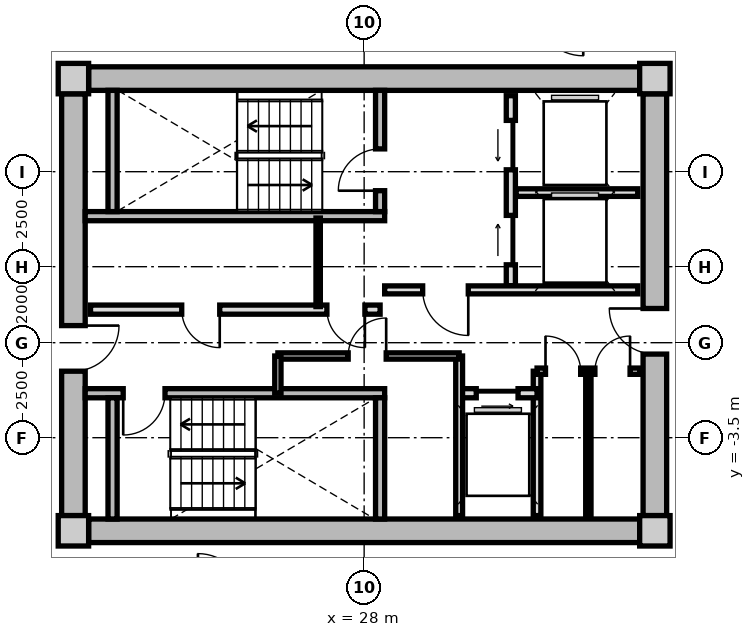
"""IFC4 building model, lengths in metres.
Left out: names, types, materials, properties, quantities, classifications, styles, units other than length and angle.
Written with IfcOpenShell. Run it as: python <this file> out.ifc"""

import sys

from ifc_helpers import new_model, si_unit, direction, frame, frame_2d, origin, origin_2d, place, context, subcontext, project, spatial, rectangle, extrude, source, transform, mapped, element, fill, save


model = new_model("IFC4")
c1 = context("Model", 3, precision=1e-05, world=origin(), true_north=direction((0.0, 1.0)))
c2 = subcontext(c1, "Body", "Model", "MODEL_VIEW")
j1 = project(units=[si_unit("LENGTHUNIT", "METRE"), si_unit("PLANEANGLEUNIT", "RADIAN")], contexts=[c1])
p1 = place(None, origin())
s1 = spatial("IfcSite", under=j1, at=p1, CompositionType="ELEMENT")
p2 = place(p1, origin())
s2 = spatial("IfcBuilding", under=s1, at=p2, CompositionType="ELEMENT")
p3 = place(p2, frame((0.0, 0.0, 164.8)))
s3 = spatial("IfcBuildingStorey", under=s2, at=p3, CompositionType="ELEMENT", Elevation=164.8)
m1 = source(origin(), c2, "Body", "SweptSolid", [
    extrude(rectangle(XDim=0.8, YDim=0.8, at=origin_2d()), origin(), (0.0, 0.0, 1.0), 3.05),
])
for number, where, z_axis, x_axis in (
    (1, (20.35, -5.95, 0.0), (0.0, 0.0, 1.0), (1.0, 0.0, 0.0)),
    (2, (35.65, -5.95, 0.0), (0.0, 0.0, 1.0), (1.0, 0.0, 0.0)),
    (3, (35.65, 5.95, 0.0), (0.0, 0.0, 1.0), (1.0, 0.0, 0.0)),
    (4, (20.35, 5.95, 0.0), (0.0, 0.0, 1.0), (1.0, 0.0, 0.0)),
):
    element("IfcColumn", number, at=place(p3, frame(where, z_axis=z_axis, x_axis=x_axis)), inside=s3, PredefinedType="COLUMN", context=c2, shape_type="MappedRepresentation", body=[
        mapped(m1, transform((0.0, 0.0, 0.0), x_axis=(1.0, 0.0, 0.0), y_axis=(0.0, 1.0, 0.0), z_axis=(0.0, 0.0, 1.0), scale=1.0)),
    ])
m2 = source(origin(), c2, "Body", "SweptSolid", [
    extrude(rectangle(XDim=14.5, YDim=0.62, at=frame_2d((7.25, 0.0))), origin(), (0.0, 0.0, 1.0), 2.81),
])
for number, where, z_axis, x_axis in (
    (5, (20.75, 5.95, 0.0), (0.0, 0.0, 1.0), (1.0, 0.0, 0.0)),
    (6, (35.25, -5.95, 0.0), (0.0, 0.0, 1.0), (-1.0, 0.0, 0.0)),
):
    element("IfcWall", number, at=place(p3, frame(where, z_axis=z_axis, x_axis=x_axis)), inside=s3, PredefinedType="SHEAR", context=c2, shape_type="MappedRepresentation", body=[
        mapped(m2, transform((0.0, 0.0, 0.0), x_axis=(1.0, 0.0, 0.0), y_axis=(0.0, 1.0, 0.0), z_axis=(0.0, 0.0, 1.0), scale=1.0)),
    ])
m3 = source(origin(), c2, "Body", "SweptSolid", [
    extrude(rectangle(XDim=11.1, YDim=0.62, at=frame_2d((5.55, 0.0))), origin(), (0.0, 0.0, 1.0), 2.81),
])
p4 = place(p3, frame((20.35, -5.55, 0.0), z_axis=(0.0, 0.0, 1.0), x_axis=(0.0, 1.0, 0.0)))
e7 = element("IfcWall", 7, at=p4, inside=s3, PredefinedType="SHEAR", context=c2, shape_type="MappedRepresentation", body=[
    mapped(m3, transform((0.0, 0.0, 0.0), x_axis=(1.0, 0.0, 0.0), y_axis=(0.0, 1.0, 0.0), z_axis=(0.0, 0.0, 1.0), scale=1.0)),
])
p5 = place(p4, frame((3.8, 0.0, 0.0)))
e8 = element("IfcOpeningElement", 8, at=p5, cuts=e7, PredefinedType="OPENING", context=c2, shape_type="SweptSolid", body=[
    extrude(rectangle(XDim=1.2, YDim=2.15, at=frame_2d((0.6, 1.075))), frame((0.0, 0.32, 0.0), z_axis=(0.0, -1.0, 0.0), x_axis=(1.0, 0.0, 0.0)), (0.0, 0.0, 1.0), 0.64),
])
p6 = place(p3, frame((35.65, 5.55, 0.0), z_axis=(0.0, 0.0, 1.0), x_axis=(0.0, -1.0, 0.0)))
e9 = element("IfcWall", 9, at=p6, inside=s3, PredefinedType="SHEAR", context=c2, shape_type="MappedRepresentation", body=[
    mapped(m3, transform((0.0, 0.0, 0.0), x_axis=(1.0, 0.0, 0.0), y_axis=(0.0, 1.0, 0.0), z_axis=(0.0, 0.0, 1.0), scale=1.0)),
])
p7 = place(p6, frame((5.65, 0.0, 0.0)))
e10 = element("IfcOpeningElement", 10, at=p7, cuts=e9, PredefinedType="OPENING", context=c2, shape_type="SweptSolid", body=[
    extrude(rectangle(XDim=1.2, YDim=2.15, at=frame_2d((0.6, 1.075))), frame((0.0, 0.32, 0.0), z_axis=(0.0, -1.0, 0.0), x_axis=(1.0, 0.0, 0.0)), (0.0, 0.0, 1.0), 0.64),
])
m4 = source(origin(), c2, "Body", "SweptSolid", [
    extrude(rectangle(XDim=7.88, YDim=0.24, at=frame_2d((3.94, 0.0))), origin(), (0.0, 0.0, 1.0), 2.81),
])
p8 = place(p3, frame((20.66, 2.33, 0.0), z_axis=(0.0, 0.0, 1.0), x_axis=(1.0, 0.0, 0.0)))
e11 = element("IfcWall", 11, at=p8, inside=s3, PredefinedType="PARTITIONING", context=c2, shape_type="MappedRepresentation", body=[
    mapped(m4, transform((0.0, 0.0, 0.0), x_axis=(1.0, 0.0, 0.0), y_axis=(0.0, 1.0, 0.0), z_axis=(0.0, 0.0, 1.0), scale=1.0)),
])
m5 = source(origin(), c2, "Body", "SweptSolid", [
    extrude(rectangle(XDim=3.19, YDim=0.24, at=frame_2d((1.595, 0.0))), origin(), (0.0, 0.0, 1.0), 2.81),
])
p9 = place(p3, frame((21.38, 2.45, 0.0), z_axis=(0.0, 0.0, 1.0), x_axis=(0.0, 1.0, 0.0)))
e12 = element("IfcWall", 12, at=p9, inside=s3, PredefinedType="PARTITIONING", context=c2, shape_type="MappedRepresentation", body=[
    mapped(m5, transform((0.0, 0.0, 0.0), x_axis=(1.0, 0.0, 0.0), y_axis=(0.0, 1.0, 0.0), z_axis=(0.0, 0.0, 1.0), scale=1.0)),
])
p10 = place(p3, frame((28.42, 2.45, 0.0), z_axis=(0.0, 0.0, 1.0), x_axis=(0.0, 1.0, 0.0)))
e13 = element("IfcWall", 13, at=p10, inside=s3, PredefinedType="PARTITIONING", context=c2, shape_type="MappedRepresentation", body=[
    mapped(m5, transform((0.0, 0.0, 0.0), x_axis=(1.0, 0.0, 0.0), y_axis=(0.0, 1.0, 0.0), z_axis=(0.0, 0.0, 1.0), scale=1.0)),
])
p11 = place(p10, frame((0.55, 0.0, 0.0)))
e14 = element("IfcOpeningElement", 14, at=p11, cuts=e13, PredefinedType="OPENING", context=c2, shape_type="SweptSolid", body=[
    extrude(rectangle(XDim=1.1, YDim=2.15, at=frame_2d((0.55, 1.075))), frame((0.0, 0.13, 0.0), z_axis=(0.0, -1.0, 0.0), x_axis=(1.0, 0.0, 0.0)), (0.0, 0.0, 1.0), 0.26),
])
p12 = place(p3, frame((20.66, -2.33, 0.0), z_axis=(0.0, 0.0, 1.0), x_axis=(1.0, 0.0, 0.0)))
e15 = element("IfcWall", 15, at=p12, inside=s3, PredefinedType="PARTITIONING", context=c2, shape_type="MappedRepresentation", body=[
    mapped(m4, transform((0.0, 0.0, 0.0), x_axis=(1.0, 0.0, 0.0), y_axis=(0.0, 1.0, 0.0), z_axis=(0.0, 0.0, 1.0), scale=1.0)),
])
p13 = place(p12, frame((1.0, 0.0, 0.0)))
e16 = element("IfcOpeningElement", 16, at=p13, cuts=e15, PredefinedType="OPENING", context=c2, shape_type="SweptSolid", body=[
    extrude(rectangle(XDim=1.1, YDim=2.15, at=frame_2d((0.55, 1.075))), frame((0.0, 0.13, 0.0), z_axis=(0.0, -1.0, 0.0), x_axis=(1.0, 0.0, 0.0)), (0.0, 0.0, 1.0), 0.26),
])
for number, where, z_axis, x_axis in (
    (17, (21.38, -5.64, 0.0), (0.0, 0.0, 1.0), (0.0, 1.0, 0.0)),
    (18, (28.42, -5.64, 0.0), (0.0, 0.0, 1.0), (0.0, 1.0, 0.0)),
):
    element("IfcWall", number, at=place(p3, frame(where, z_axis=z_axis, x_axis=x_axis)), inside=s3, PredefinedType="PARTITIONING", context=c2, shape_type="MappedRepresentation", body=[
        mapped(m5, transform((0.0, 0.0, 0.0), x_axis=(1.0, 0.0, 0.0), y_axis=(0.0, 1.0, 0.0), z_axis=(0.0, 0.0, 1.0), scale=1.0)),
    ])
m6 = source(origin(), c2, "Body", "SweptSolid", [
    extrude(rectangle(XDim=5.0, YDim=0.24, at=frame_2d((2.5, 0.0))), origin(), (0.0, 0.0, 1.0), 2.795),
])
p14 = place(p3, frame((31.86, 0.5, 0.0), z_axis=(0.0, 0.0, 1.0), x_axis=(0.0, 1.0, 0.0)))
e19 = element("IfcWall", 19, at=p14, inside=s3, PredefinedType="PARTITIONING", context=c2, shape_type="MappedRepresentation", body=[
    mapped(m6, transform((0.0, 0.0, 0.0), x_axis=(1.0, 0.0, 0.0), y_axis=(0.0, 1.0, 0.0), z_axis=(0.0, 0.0, 1.0), scale=1.0)),
])
p15 = place(p14, frame((3.05, 0.0, 0.0)))
e20 = element("IfcOpeningElement", 20, at=p15, cuts=e19, PredefinedType="OPENING", context=c2, shape_type="SweptSolid", body=[
    extrude(rectangle(XDim=1.3, YDim=2.2, at=frame_2d((0.65, 1.1))), frame((0.0, 0.13, 0.0), z_axis=(0.0, -1.0, 0.0), x_axis=(1.0, 0.0, 0.0)), (0.0, 0.0, 1.0), 0.26),
])
p16 = place(p14, frame((0.55, 0.0, 0.0)))
e21 = element("IfcOpeningElement", 21, at=p16, cuts=e19, PredefinedType="OPENING", context=c2, shape_type="SweptSolid", body=[
    extrude(rectangle(XDim=1.3, YDim=2.2, at=frame_2d((0.65, 1.1))), frame((0.0, 0.13, 0.0), z_axis=(0.0, -1.0, 0.0), x_axis=(1.0, 0.0, 0.0)), (0.0, 0.0, 1.0), 0.26),
])
m7 = source(origin(), c2, "Body", "SweptSolid", [
    extrude(rectangle(XDim=3.2, YDim=0.2, at=frame_2d((1.6, 0.0))), origin(), (0.0, 0.0, 1.0), 2.795),
])
p17 = place(p3, frame((32.0, 2.95, 0.0), z_axis=(0.0, 0.0, 1.0), x_axis=(1.0, 0.0, 0.0)))
e22 = element("IfcWall", 22, at=p17, inside=s3, PredefinedType="PARTITIONING", context=c2, shape_type="MappedRepresentation", body=[
    mapped(m7, transform((0.0, 0.0, 0.0), x_axis=(1.0, 0.0, 0.0), y_axis=(0.0, 1.0, 0.0), z_axis=(0.0, 0.0, 1.0), scale=1.0)),
])
m8 = source(origin(), c2, "Body", "SweptSolid", [
    extrude(rectangle(XDim=6.66, YDim=0.21, at=frame_2d((3.33, 0.0))), origin(), (0.0, 0.0, 1.0), 2.795),
])
p18 = place(p3, frame((28.54, 0.39, 0.0), z_axis=(0.0, 0.0, 1.0), x_axis=(1.0, 0.0, 0.0)))
e23 = element("IfcWall", 23, at=p18, inside=s3, PredefinedType="PARTITIONING", context=c2, shape_type="MappedRepresentation", body=[
    mapped(m8, transform((0.0, 0.0, 0.0), x_axis=(1.0, 0.0, 0.0), y_axis=(0.0, 1.0, 0.0), z_axis=(0.0, 0.0, 1.0), scale=1.0)),
])
p19 = place(p18, frame((1.0, 0.0, 0.0)))
e24 = element("IfcOpeningElement", 24, at=p19, cuts=e23, PredefinedType="OPENING", context=c2, shape_type="SweptSolid", body=[
    extrude(rectangle(XDim=1.2, YDim=2.15, at=frame_2d((0.6, 1.075))), frame((0.0, 0.115, 0.0), z_axis=(0.0, -1.0, 0.0), x_axis=(1.0, 0.0, 0.0)), (0.0, 0.0, 1.0), 0.23),
])
m9 = source(origin(), c2, "Body", "SweptSolid", [
    extrude(rectangle(XDim=7.62, YDim=0.24, at=frame_2d((3.81, 0.0))), origin(), (0.0, 0.0, 1.0), 2.795),
])
p20 = place(p3, frame((20.8, -0.13, 0.0), z_axis=(0.0, 0.0, 1.0), x_axis=(1.0, 0.0, 0.0)))
e25 = element("IfcWall", 25, at=p20, inside=s3, PredefinedType="PARTITIONING", context=c2, shape_type="MappedRepresentation", body=[
    mapped(m9, transform((0.0, 0.0, 0.0), x_axis=(1.0, 0.0, 0.0), y_axis=(0.0, 1.0, 0.0), z_axis=(0.0, 0.0, 1.0), scale=1.0)),
])
p21 = place(p20, frame((6.22, 0.0, 0.0)))
e26 = element("IfcOpeningElement", 26, at=p21, cuts=e25, PredefinedType="OPENING", context=c2, shape_type="SweptSolid", body=[
    extrude(rectangle(XDim=1.0, YDim=2.1, at=frame_2d((0.5, 1.05))), frame((0.0, 0.13, 0.0), z_axis=(0.0, -1.0, 0.0), x_axis=(1.0, 0.0, 0.0)), (0.0, 0.0, 1.0), 0.26),
])
p22 = place(p20, frame((2.4, 0.0, 0.0)))
e27 = element("IfcOpeningElement", 27, at=p22, cuts=e25, PredefinedType="OPENING", context=c2, shape_type="SweptSolid", body=[
    extrude(rectangle(XDim=1.0, YDim=2.1, at=frame_2d((0.5, 1.05))), frame((0.0, 0.13, 0.0), z_axis=(0.0, -1.0, 0.0), x_axis=(1.0, 0.0, 0.0)), (0.0, 0.0, 1.0), 0.26),
])
m10 = source(origin(), c2, "Body", "SweptSolid", [
    extrude(rectangle(XDim=2.33, YDim=0.115, at=frame_2d((1.165, 0.0))), origin(), (0.0, 0.0, 1.0), 2.795),
])
p23 = place(p3, frame((26.79, -0.05, 0.0), z_axis=(0.0, 0.0, 1.0), x_axis=(0.0, 1.0, 0.0)))
e28 = element("IfcWall", 28, at=p23, inside=s3, PredefinedType="PARTITIONING", context=c2, shape_type="MappedRepresentation", body=[
    mapped(m10, transform((0.0, 0.0, 0.0), x_axis=(1.0, 0.0, 0.0), y_axis=(0.0, 1.0, 0.0), z_axis=(0.0, 0.0, 1.0), scale=1.0)),
])
m11 = source(origin(), c2, "Body", "SweptSolid", [
    extrude(rectangle(XDim=3.8, YDim=0.2, at=frame_2d((1.9, 0.0))), origin(), (0.0, 0.0, 1.0), 2.795),
])
p24 = place(p3, frame((32.55, -5.55, 0.0), z_axis=(0.0, 0.0, 1.0), x_axis=(0.0, 1.0, 0.0)))
e29 = element("IfcWall", 29, at=p24, inside=s3, PredefinedType="PARTITIONING", context=c2, shape_type="MappedRepresentation", body=[
    mapped(m11, transform((0.0, 0.0, 0.0), x_axis=(1.0, 0.0, 0.0), y_axis=(0.0, 1.0, 0.0), z_axis=(0.0, 0.0, 1.0), scale=1.0)),
])
m12 = source(origin(), c2, "Body", "SweptSolid", [
    extrude(rectangle(XDim=2.05, YDim=0.24, at=frame_2d((1.025, 0.0))), origin(), (0.0, 0.0, 1.0), 2.795),
])
p25 = place(p3, frame((30.5, -2.33, 0.0), z_axis=(0.0, 0.0, 1.0), x_axis=(1.0, 0.0, 0.0)))
e30 = element("IfcWall", 30, at=p25, inside=s3, PredefinedType="PARTITIONING", context=c2, shape_type="MappedRepresentation", body=[
    mapped(m12, transform((0.0, 0.0, 0.0), x_axis=(1.0, 0.0, 0.0), y_axis=(0.0, 1.0, 0.0), z_axis=(0.0, 0.0, 1.0), scale=1.0)),
])
p26 = place(p25, frame((0.45, 0.0, 0.0)))
e31 = element("IfcOpeningElement", 31, at=p26, cuts=e30, PredefinedType="OPENING", context=c2, shape_type="SweptSolid", body=[
    extrude(rectangle(XDim=1.1, YDim=2.2, at=frame_2d((0.55, 1.1))), frame((0.0, 0.13, 0.0), z_axis=(0.0, -1.0, 0.0), x_axis=(1.0, 0.0, 0.0)), (0.0, 0.0, 1.0), 0.26),
])
m13 = source(origin(), c2, "Body", "SweptSolid", [
    extrude(rectangle(XDim=4.2, YDim=0.18, at=frame_2d((2.1, 0.0))), origin(), (0.0, 0.0, 1.0), 2.795),
])
p27 = place(p3, frame((30.5, -5.55, 0.0), z_axis=(0.0, 0.0, 1.0), x_axis=(0.0, 1.0, 0.0)))
e32 = element("IfcWall", 32, at=p27, inside=s3, PredefinedType="PARTITIONING", context=c2, shape_type="MappedRepresentation", body=[
    mapped(m13, transform((0.0, 0.0, 0.0), x_axis=(1.0, 0.0, 0.0), y_axis=(0.0, 1.0, 0.0), z_axis=(0.0, 0.0, 1.0), scale=1.0)),
])
m14 = source(origin(), c2, "Body", "SweptSolid", [
    extrude(rectangle(XDim=4.77, YDim=0.165, at=frame_2d((2.385, 0.0))), origin(), (0.0, 0.0, 1.0), 2.795),
])
p28 = place(p3, frame((25.73, -1.35, 0.0), z_axis=(0.0, 0.0, 1.0), x_axis=(1.0, 0.0, 0.0)))
e33 = element("IfcWall", 33, at=p28, inside=s3, PredefinedType="PARTITIONING", context=c2, shape_type="MappedRepresentation", body=[
    mapped(m14, transform((0.0, 0.0, 0.0), x_axis=(1.0, 0.0, 0.0), y_axis=(0.0, 1.0, 0.0), z_axis=(0.0, 0.0, 1.0), scale=1.0)),
])
p29 = place(p28, frame((1.85, 0.0, 0.0)))
e34 = element("IfcOpeningElement", 34, at=p29, cuts=e33, PredefinedType="OPENING", context=c2, shape_type="SweptSolid", body=[
    extrude(rectangle(XDim=1.0, YDim=2.1, at=frame_2d((0.5, 1.05))), frame((0.0, 0.093, 0.0), z_axis=(0.0, -1.0, 0.0), x_axis=(1.0, 0.0, 0.0)), (0.0, 0.0, 1.0), 0.185),
])
m15 = source(origin(), c2, "Body", "SweptSolid", [
    extrude(rectangle(XDim=0.98, YDim=0.165, at=frame_2d((0.49, 0.0))), origin(), (0.0, 0.0, 1.0), 2.795),
])
p30 = place(p3, frame((25.73, -2.33, 0.0), z_axis=(0.0, 0.0, 1.0), x_axis=(0.0, 1.0, 0.0)))
e35 = element("IfcWall", 35, at=p30, inside=s3, PredefinedType="PARTITIONING", context=c2, shape_type="MappedRepresentation", body=[
    mapped(m15, transform((0.0, 0.0, 0.0), x_axis=(1.0, 0.0, 0.0), y_axis=(0.0, 1.0, 0.0), z_axis=(0.0, 0.0, 1.0), scale=1.0)),
])
m16 = source(origin(), c2, "Body", "SweptSolid", [
    extrude(rectangle(XDim=2.7, YDim=0.165, at=frame_2d((1.35, 0.0))), origin(), (0.0, 0.0, 1.0), 2.795),
])
p31 = place(p3, frame((32.55, -1.75, 0.0), z_axis=(0.0, 0.0, 1.0), x_axis=(1.0, 0.0, 0.0)))
e36 = element("IfcWall", 36, at=p31, inside=s3, PredefinedType="PARTITIONING", context=c2, shape_type="MappedRepresentation", body=[
    mapped(m16, transform((0.0, 0.0, 0.0), x_axis=(1.0, 0.0, 0.0), y_axis=(0.0, 1.0, 0.0), z_axis=(0.0, 0.0, 1.0), scale=1.0)),
])
p32 = place(p31, frame((0.222, 0.0, 0.0)))
e37 = element("IfcOpeningElement", 37, at=p32, cuts=e36, PredefinedType="OPENING", context=c2, shape_type="SweptSolid", body=[
    extrude(rectangle(XDim=0.925, YDim=2.1, at=frame_2d((0.462, 1.05))), frame((0.0, 0.093, 0.0), z_axis=(0.0, -1.0, 0.0), x_axis=(1.0, 0.0, 0.0)), (0.0, 0.0, 1.0), 0.185),
])
p33 = place(p31, frame((1.522, 0.0, 0.0)))
e38 = element("IfcOpeningElement", 38, at=p33, cuts=e36, PredefinedType="OPENING", context=c2, shape_type="SweptSolid", body=[
    extrude(rectangle(XDim=0.925, YDim=2.1, at=frame_2d((0.462, 1.05))), frame((0.0, 0.093, 0.0), z_axis=(0.0, -1.0, 0.0), x_axis=(1.0, 0.0, 0.0)), (0.0, 0.0, 1.0), 0.185),
])
m17 = source(origin(), c2, "Body", "SweptSolid", [
    extrude(rectangle(XDim=3.8, YDim=0.14, at=frame_2d((1.9, 0.0))), origin(), (0.0, 0.0, 1.0), 2.795),
])
p34 = place(p3, frame((33.9, -5.55, 0.0), z_axis=(0.0, 0.0, 1.0), x_axis=(0.0, 1.0, 0.0)))
e39 = element("IfcWall", 39, at=p34, inside=s3, PredefinedType="PARTITIONING", context=c2, shape_type="MappedRepresentation", body=[
    mapped(m17, transform((0.0, 0.0, 0.0), x_axis=(1.0, 0.0, 0.0), y_axis=(0.0, 1.0, 0.0), z_axis=(0.0, 0.0, 1.0), scale=1.0)),
])
m18 = source(origin(), c2, "Body", "SweptSolid", [
    extrude(rectangle(XDim=1.1, YDim=2.15, at=frame_2d((0.55, 1.075))), frame((0.0, 0.025, 0.0), z_axis=(0.0, -1.0, 0.0), x_axis=(1.0, 0.0, 0.0)), (0.0, 0.0, 1.0), 0.05),
])
p35 = place(p11, origin())
e40 = element("IfcDoor", 40, at=p35, inside=s3, OperationType="SINGLE_SWING_LEFT", PredefinedType="DOOR", context=c2, shape_type="MappedRepresentation", body=[
    mapped(m18, transform((0.0, 0.0, 0.0), x_axis=(1.0, 0.0, 0.0), y_axis=(0.0, 1.0, 0.0), z_axis=(0.0, 0.0, 1.0), scale=1.0)),
])
fill(e14, e40)
p36 = place(p13, frame((1.1, 0.0, 0.0), z_axis=(0.0, 0.0, 1.0), x_axis=(-1.0, 0.0, 0.0)))
e41 = element("IfcDoor", 41, at=p36, inside=s3, OperationType="SINGLE_SWING_RIGHT", PredefinedType="DOOR", context=c2, shape_type="MappedRepresentation", body=[
    mapped(m18, transform((0.0, 0.0, 0.0), x_axis=(1.0, 0.0, 0.0), y_axis=(0.0, 1.0, 0.0), z_axis=(0.0, 0.0, 1.0), scale=1.0)),
])
fill(e16, e41)
m19 = source(origin(), c2, "Body", "SweptSolid", [
    extrude(rectangle(XDim=1.3, YDim=2.2, at=frame_2d((0.65, 1.1))), frame((0.0, 0.025, 0.0), z_axis=(0.0, -1.0, 0.0), x_axis=(1.0, 0.0, 0.0)), (0.0, 0.0, 1.0), 0.05),
])
p37 = place(p15, origin())
e42 = element("IfcDoor", 42, at=p37, inside=s3, OperationType="SLIDING_TO_LEFT", PredefinedType="DOOR", context=c2, shape_type="MappedRepresentation", body=[
    mapped(m19, transform((0.0, 0.0, 0.0), x_axis=(1.0, 0.0, 0.0), y_axis=(0.0, 1.0, 0.0), z_axis=(0.0, 0.0, 1.0), scale=1.0)),
])
fill(e20, e42)
p38 = place(p16, origin())
e43 = element("IfcDoor", 43, at=p38, inside=s3, OperationType="SLIDING_TO_RIGHT", PredefinedType="DOOR", context=c2, shape_type="MappedRepresentation", body=[
    mapped(m19, transform((0.0, 0.0, 0.0), x_axis=(1.0, 0.0, 0.0), y_axis=(0.0, 1.0, 0.0), z_axis=(0.0, 0.0, 1.0), scale=1.0)),
])
fill(e21, e43)
m20 = source(origin(), c2, "Body", "SweptSolid", [
    extrude(rectangle(XDim=1.2, YDim=2.15, at=frame_2d((0.6, 1.075))), frame((0.0, 0.025, 0.0), z_axis=(0.0, -1.0, 0.0), x_axis=(1.0, 0.0, 0.0)), (0.0, 0.0, 1.0), 0.05),
])
p39 = place(p19, frame((1.2, 0.0, 0.0), z_axis=(0.0, 0.0, 1.0), x_axis=(-1.0, 0.0, 0.0)))
e44 = element("IfcDoor", 44, at=p39, inside=s3, OperationType="SINGLE_SWING_LEFT", PredefinedType="DOOR", context=c2, shape_type="MappedRepresentation", body=[
    mapped(m20, transform((0.0, 0.0, 0.0), x_axis=(1.0, 0.0, 0.0), y_axis=(0.0, 1.0, 0.0), z_axis=(0.0, 0.0, 1.0), scale=1.0)),
])
fill(e24, e44)
p40 = place(p5, frame((1.2, 0.0, 0.0), z_axis=(0.0, 0.0, 1.0), x_axis=(-1.0, 0.0, 0.0)))
e45 = element("IfcDoor", 45, at=p40, inside=s3, OperationType="SINGLE_SWING_LEFT", PredefinedType="DOOR", context=c2, shape_type="MappedRepresentation", body=[
    mapped(m20, transform((0.0, 0.0, 0.0), x_axis=(1.0, 0.0, 0.0), y_axis=(0.0, 1.0, 0.0), z_axis=(0.0, 0.0, 1.0), scale=1.0)),
])
fill(e8, e45)
p41 = place(p7, frame((1.2, 0.0, 0.0), z_axis=(0.0, 0.0, 1.0), x_axis=(-1.0, 0.0, 0.0)))
e46 = element("IfcDoor", 46, at=p41, inside=s3, OperationType="SINGLE_SWING_RIGHT", PredefinedType="DOOR", context=c2, shape_type="MappedRepresentation", body=[
    mapped(m20, transform((0.0, 0.0, 0.0), x_axis=(1.0, 0.0, 0.0), y_axis=(0.0, 1.0, 0.0), z_axis=(0.0, 0.0, 1.0), scale=1.0)),
])
fill(e10, e46)
m21 = source(origin(), c2, "Body", "SweptSolid", [
    extrude(rectangle(XDim=1.0, YDim=2.1, at=frame_2d((0.5, 1.05))), frame((0.0, 0.025, 0.0), z_axis=(0.0, -1.0, 0.0), x_axis=(1.0, 0.0, 0.0)), (0.0, 0.0, 1.0), 0.05),
])
p42 = place(p21, frame((1.0, 0.0, 0.0), z_axis=(0.0, 0.0, 1.0), x_axis=(-1.0, 0.0, 0.0)))
e47 = element("IfcDoor", 47, at=p42, inside=s3, OperationType="SINGLE_SWING_LEFT", PredefinedType="DOOR", context=c2, shape_type="MappedRepresentation", body=[
    mapped(m21, transform((0.0, 0.0, 0.0), x_axis=(1.0, 0.0, 0.0), y_axis=(0.0, 1.0, 0.0), z_axis=(0.0, 0.0, 1.0), scale=1.0)),
])
fill(e26, e47)
p43 = place(p22, frame((1.0, 0.0, 0.0), z_axis=(0.0, 0.0, 1.0), x_axis=(-1.0, 0.0, 0.0)))
e48 = element("IfcDoor", 48, at=p43, inside=s3, OperationType="SINGLE_SWING_LEFT", PredefinedType="DOOR", context=c2, shape_type="MappedRepresentation", body=[
    mapped(m21, transform((0.0, 0.0, 0.0), x_axis=(1.0, 0.0, 0.0), y_axis=(0.0, 1.0, 0.0), z_axis=(0.0, 0.0, 1.0), scale=1.0)),
])
fill(e27, e48)
m22 = source(origin(), c2, "Body", "SweptSolid", [
    extrude(rectangle(XDim=1.1, YDim=2.2, at=frame_2d((0.55, 1.1))), frame((0.0, 0.025, 0.0), z_axis=(0.0, -1.0, 0.0), x_axis=(1.0, 0.0, 0.0)), (0.0, 0.0, 1.0), 0.05),
])
p44 = place(p26, frame((1.1, 0.0, 0.0), z_axis=(0.0, 0.0, 1.0), x_axis=(-1.0, 0.0, 0.0)))
e49 = element("IfcDoor", 49, at=p44, inside=s3, OperationType="SLIDING_TO_RIGHT", PredefinedType="DOOR", context=c2, shape_type="MappedRepresentation", body=[
    mapped(m22, transform((0.0, 0.0, 0.0), x_axis=(1.0, 0.0, 0.0), y_axis=(0.0, 1.0, 0.0), z_axis=(0.0, 0.0, 1.0), scale=1.0)),
])
fill(e31, e49)
p45 = place(p29, origin())
e50 = element("IfcDoor", 50, at=p45, inside=s3, OperationType="SINGLE_SWING_RIGHT", PredefinedType="DOOR", context=c2, shape_type="MappedRepresentation", body=[
    mapped(m21, transform((0.0, 0.0, 0.0), x_axis=(1.0, 0.0, 0.0), y_axis=(0.0, 1.0, 0.0), z_axis=(0.0, 0.0, 1.0), scale=1.0)),
])
fill(e34, e50)
m23 = source(origin(), c2, "Body", "SweptSolid", [
    extrude(rectangle(XDim=0.925, YDim=2.1, at=frame_2d((0.462, 1.05))), frame((0.0, 0.025, 0.0), z_axis=(0.0, -1.0, 0.0), x_axis=(1.0, 0.0, 0.0)), (0.0, 0.0, 1.0), 0.05),
])
p46 = place(p32, origin())
e51 = element("IfcDoor", 51, at=p46, inside=s3, OperationType="SINGLE_SWING_LEFT", PredefinedType="DOOR", context=c2, shape_type="MappedRepresentation", body=[
    mapped(m23, transform((0.0, 0.0, 0.0), x_axis=(1.0, 0.0, 0.0), y_axis=(0.0, 1.0, 0.0), z_axis=(0.0, 0.0, 1.0), scale=1.0)),
])
fill(e37, e51)
p47 = place(p33, origin())
e52 = element("IfcDoor", 52, at=p47, inside=s3, OperationType="SINGLE_SWING_RIGHT", PredefinedType="DOOR", context=c2, shape_type="MappedRepresentation", body=[
    mapped(m23, transform((0.0, 0.0, 0.0), x_axis=(1.0, 0.0, 0.0), y_axis=(0.0, 1.0, 0.0), z_axis=(0.0, 0.0, 1.0), scale=1.0)),
])
fill(e38, e52)
save(model, sys.argv[1])
